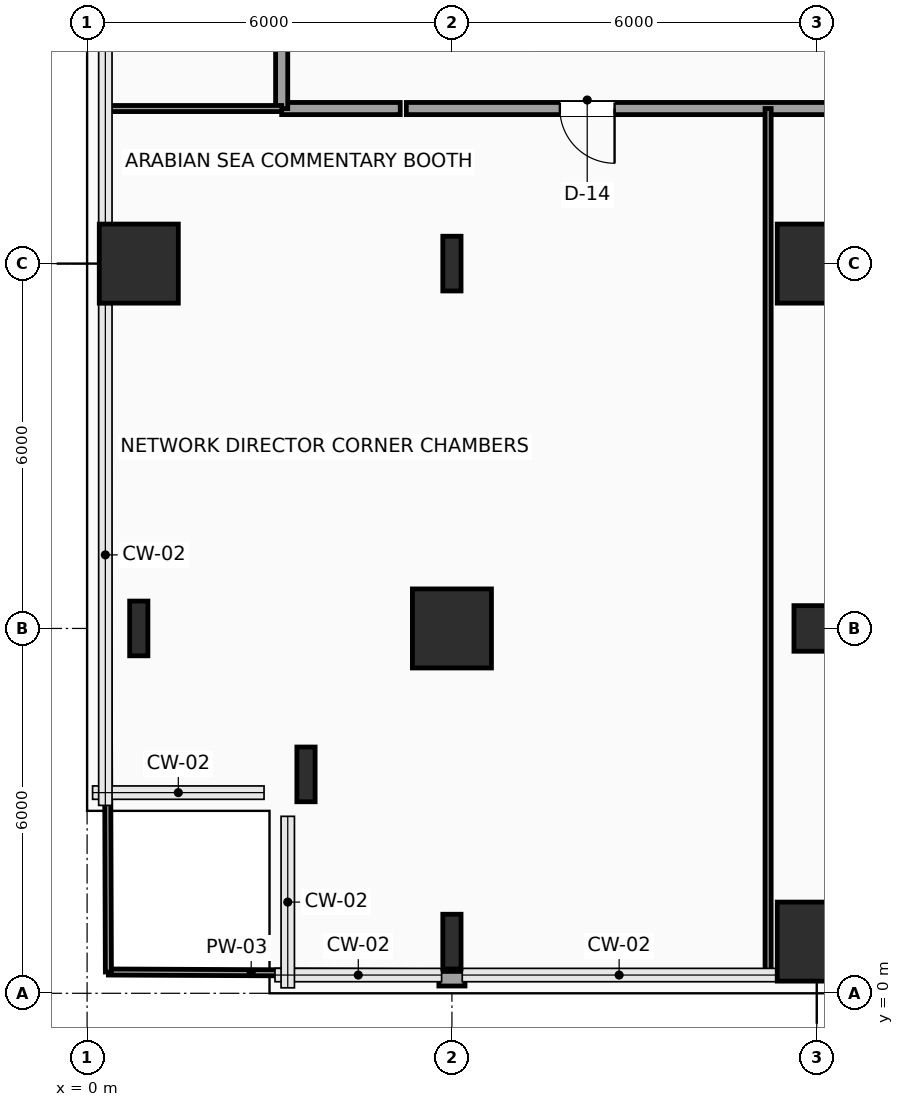
"""IFC4 building model, lengths in metres.
Left out: names, types, materials, properties, quantities, classifications, styles, units other than length and angle.
Written with IfcOpenShell. Run it as: python <this file> out.ifc"""

import sys

from ifc_helpers import new_model, si_unit, direction, frame, frame_2d, origin, origin_2d, place, context, subcontext, project, spatial, rectangle, hollow_rectangle, i_section, extrude, element, fill, save


model = new_model("IFC4")
c1 = context("Model", 3, precision=1e-05, world=origin(), true_north=direction((0.0, 1.0)))
c2 = subcontext(c1, "Body", "Model", "MODEL_VIEW")
j1 = project(units=[si_unit("LENGTHUNIT", "METRE"), si_unit("PLANEANGLEUNIT", "RADIAN")], contexts=[c1])
p1 = place(None, origin())
s1 = spatial("IfcSite", under=j1, at=p1, CompositionType="ELEMENT")
p2 = place(p1, origin())
s2 = spatial("IfcBuilding", under=s1, at=p2, CompositionType="ELEMENT")
p3 = place(p2, frame((0.0, 0.0, 90.9)))
s3 = spatial("IfcBuildingStorey", under=s2, at=p3, CompositionType="ELEMENT", Elevation=90.9)
for number, where, z_axis, x_axis in (
    (1, (3.6, 3.6, 0.0), (0.0, 0.0, 1.0), (1.0, 0.0, 0.0)),
    (2, (0.85, 6.0, 0.0), (0.0, 0.0, 1.0), (1.0, 0.0, 0.0)),
):
    element("IfcColumn", number, at=place(p3, frame(where, z_axis=z_axis, x_axis=x_axis)), inside=s3, PredefinedType="COLUMN", context=c2, shape_type="SweptSolid", body=[
        extrude(i_section(OverallWidth=0.3, OverallDepth=0.9, WebThickness=0.019, FlangeThickness=0.035, FilletRadius=0.03, at=origin_2d()), origin(), (0.0, 0.0, 1.0), 3.9),
    ])
p4 = place(p3, frame((0.85, 12.0, 0.0), z_axis=(0.0, 0.0, 1.0), x_axis=(1.0, 0.0, 0.0)))
e3 = element("IfcColumn", 3, at=p4, inside=s3, PredefinedType="COLUMN", context=c2, shape_type="SweptSolid", body=[
    extrude(rectangle(XDim=1.3, YDim=1.3, at=origin_2d()), origin(), (0.0, 0.0, 1.0), 3.9),
])
p5 = place(p3, frame((6.0, 0.85, 0.0), z_axis=(0.0, 0.0, 1.0), x_axis=(1.0, 0.0, 0.0)))
e4 = element("IfcColumn", 4, at=p5, inside=s3, PredefinedType="COLUMN", context=c2, shape_type="SweptSolid", body=[
    extrude(i_section(OverallWidth=0.3, OverallDepth=0.9, WebThickness=0.019, FlangeThickness=0.035, FilletRadius=0.03, at=origin_2d()), origin(), (0.0, 0.0, 1.0), 3.9),
])
p6 = place(p3, frame((6.0, 6.0, 0.0), z_axis=(0.0, 0.0, 1.0), x_axis=(1.0, 0.0, 0.0)))
e5 = element("IfcColumn", 5, at=p6, inside=s3, PredefinedType="COLUMN", context=c2, shape_type="SweptSolid", body=[
    extrude(rectangle(XDim=1.3, YDim=1.3, at=origin_2d()), origin(), (0.0, 0.0, 1.0), 3.9),
])
p7 = place(p3, frame((6.0, 12.0, 0.0), z_axis=(0.0, 0.0, 1.0), x_axis=(1.0, 0.0, 0.0)))
e6 = element("IfcColumn", 6, at=p7, inside=s3, PredefinedType="COLUMN", context=c2, shape_type="SweptSolid", body=[
    extrude(i_section(OverallWidth=0.3, OverallDepth=0.9, WebThickness=0.019, FlangeThickness=0.035, FilletRadius=0.03, at=origin_2d()), origin(), (0.0, 0.0, 1.0), 3.9),
])
p8 = place(p3, frame((12.0, 0.85, 0.0), z_axis=(0.0, 0.0, 1.0), x_axis=(1.0, 0.0, 0.0)))
e7 = element("IfcColumn", 7, at=p8, inside=s3, PredefinedType="COLUMN", context=c2, shape_type="SweptSolid", body=[
    extrude(rectangle(XDim=1.3, YDim=1.3, at=origin_2d()), origin(), (0.0, 0.0, 1.0), 3.9),
])
p9 = place(p3, frame((12.0, 6.0, 0.0), z_axis=(0.0, 0.0, 1.0), x_axis=(1.0, 0.0, 0.0)))
e8 = element("IfcColumn", 8, at=p9, inside=s3, PredefinedType="COLUMN", context=c2, shape_type="SweptSolid", body=[
    extrude(hollow_rectangle(XDim=0.75, YDim=0.75, WallThickness=0.035, InnerFilletRadius=0.035, OuterFilletRadius=0.05, at=origin_2d()), origin(), (0.0, 0.0, 1.0), 3.9),
])
p10 = place(p3, frame((12.0, 12.0, 0.0), z_axis=(0.0, 0.0, 1.0), x_axis=(1.0, 0.0, 0.0)))
e9 = element("IfcColumn", 9, at=p10, inside=s3, PredefinedType="COLUMN", context=c2, shape_type="SweptSolid", body=[
    extrude(rectangle(XDim=1.3, YDim=1.3, at=origin_2d()), origin(), (0.0, 0.0, 1.0), 3.9),
])
p11 = place(p3, frame((6.215, 0.24, 0.0), z_axis=(0.0, 0.0, 1.0), x_axis=(-1.0, 0.0, 0.0)))
e10 = element("IfcWall", 10, at=p11, inside=s3, PredefinedType="SOLIDWALL", context=c2, shape_type="SweptSolid", body=[
    extrude(rectangle(XDim=0.43, YDim=0.24, at=frame_2d((0.215, 0.0))), origin(), (0.0, 0.0, 1.0), 3.575),
])
p12 = place(p3, frame((12.4, 14.55, 0.0), z_axis=(0.0, 0.0, 1.0), x_axis=(-1.0, 0.0, 0.0)))
e11 = element("IfcWall", 11, at=p12, inside=s3, PredefinedType="SOLIDWALL", context=c2, shape_type="SweptSolid", body=[
    extrude(rectangle(XDim=7.15, YDim=0.2, at=frame_2d((3.575, 0.0))), origin(), (0.0, 0.0, 1.0), 3.575),
])
p13 = place(p12, frame((3.725, 0.0, 0.0)))
e12 = element("IfcOpeningElement", 12, at=p13, cuts=e11, PredefinedType="OPENING", context=c2, shape_type="SweptSolid", body=[
    extrude(rectangle(XDim=0.9, YDim=2.1, at=frame_2d((0.45, 1.05))), frame((0.0, 0.11, 0.0), z_axis=(0.0, -1.0, 0.0), x_axis=(1.0, 0.0, 0.0)), (0.0, 0.0, 1.0), 0.22),
])
p14 = place(p3, frame((5.15, 14.55, 0.0), z_axis=(0.0, 0.0, 1.0), x_axis=(-1.0, 0.0, 0.0)))
e13 = element("IfcWall", 13, at=p14, inside=s3, PredefinedType="SOLIDWALL", context=c2, shape_type="SweptSolid", body=[
    extrude(rectangle(XDim=1.95, YDim=0.2, at=frame_2d((0.975, 0.0))), origin(), (0.0, 0.0, 1.0), 3.575),
])
p15 = place(p3, frame((3.2, 14.55, 0.0), z_axis=(0.0, 0.0, 1.0), x_axis=(0.0, 1.0, 0.0)))
e14 = element("IfcWall", 14, at=p15, inside=s3, PredefinedType="SOLIDWALL", context=c2, shape_type="SweptSolid", body=[
    extrude(rectangle(XDim=15.7, YDim=0.2, at=frame_2d((7.85, 0.0))), origin(), (0.0, 0.0, 1.0), 3.575),
])
p16 = place(p15, frame((2.65, 0.0, 0.0)))
e15 = element("IfcOpeningElement", 15, at=p16, cuts=e14, PredefinedType="OPENING", context=c2, shape_type="SweptSolid", body=[
    extrude(rectangle(XDim=0.9, YDim=2.1, at=frame_2d((0.45, 1.05))), frame((0.0, 0.11, 0.0), z_axis=(0.0, -1.0, 0.0), x_axis=(1.0, 0.0, 0.0)), (0.0, 0.0, 1.0), 0.22),
])
p17 = place(p15, frame((8.85, 0.0, 0.0)))
e16 = element("IfcOpeningElement", 16, at=p17, cuts=e14, PredefinedType="OPENING", context=c2, shape_type="SweptSolid", body=[
    extrude(rectangle(XDim=0.9, YDim=2.1, at=frame_2d((0.45, 1.05))), frame((0.0, 0.11, 0.0), z_axis=(0.0, -1.0, 0.0), x_axis=(1.0, 0.0, 0.0)), (0.0, 0.0, 1.0), 0.22),
])
p18 = place(p15, frame((13.6, 0.0, 0.0)))
e17 = element("IfcOpeningElement", 17, at=p18, cuts=e14, PredefinedType="OPENING", context=c2, shape_type="SweptSolid", body=[
    extrude(rectangle(XDim=0.9, YDim=2.1, at=frame_2d((0.45, 1.05))), frame((0.0, 0.11, 0.0), z_axis=(0.0, -1.0, 0.0), x_axis=(1.0, 0.0, 0.0)), (0.0, 0.0, 1.0), 0.22),
])
p19 = place(p3, frame((0.35, 0.35, 0.0), z_axis=(0.0, 0.0, 1.0), x_axis=(0.99998929595, -0.004626876487, 0.0)))
e18 = element("IfcWall", 18, at=p19, inside=s3, PredefinedType="PARTITIONING", context=c2, shape_type="SweptSolid", body=[
    extrude(rectangle(XDim=5.435, YDim=0.1, at=frame_2d((2.717, 0.0))), origin(), (0.0, 0.0, 1.0), 3.575),
])
p20 = place(p3, frame((6.215, 0.323, 0.0), z_axis=(0.0, 0.0, 1.0), x_axis=(0.999989402769, -0.00460373219, 0.0)))
e19 = element("IfcWall", 19, at=p20, inside=s3, PredefinedType="PARTITIONING", context=c2, shape_type="SweptSolid", body=[
    extrude(rectangle(XDim=4.985, YDim=0.1, at=frame_2d((2.492, 0.0))), origin(), (0.0, 0.0, 1.0), 3.575),
])
p21 = place(p3, frame((0.35, 0.35, 0.0), z_axis=(0.0, 0.0, 1.0), x_axis=(-0.003524555588, 0.999993788735, 0.0)))
e20 = element("IfcWall", 20, at=p21, inside=s3, PredefinedType="PARTITIONING", context=c2, shape_type="SweptSolid", body=[
    extrude(rectangle(XDim=14.2, YDim=0.1, at=frame_2d((7.1, 0.0))), origin(), (0.0, 0.0, 1.0), 3.575),
])
p22 = place(p3, frame((11.2, 0.3, 0.0), z_axis=(0.0, 0.0, 1.0), x_axis=(0.0, 1.0, 0.0)))
e21 = element("IfcWall", 21, at=p22, inside=s3, PredefinedType="PARTITIONING", context=c2, shape_type="SweptSolid", body=[
    extrude(rectangle(XDim=14.25, YDim=0.1, at=frame_2d((7.125, 0.0))), origin(), (0.0, 0.0, 1.0), 3.575),
])
p23 = place(p3, frame((0.3, 14.55, 0.0), z_axis=(0.0, 0.0, 1.0), x_axis=(1.0, 0.0, 0.0)))
e22 = element("IfcWall", 22, at=p23, inside=s3, PredefinedType="PARTITIONING", context=c2, shape_type="SweptSolid", body=[
    extrude(rectangle(XDim=2.9, YDim=0.1, at=frame_2d((1.45, 0.0))), origin(), (0.0, 0.0, 1.0), 3.575),
])
p24 = place(p13, origin())
e23 = element("IfcDoor", 23, at=p24, inside=s3, OperationType="SINGLE_SWING_LEFT", PredefinedType="DOOR", context=c2, shape_type="SweptSolid", body=[
    extrude(rectangle(XDim=0.9, YDim=2.1, at=frame_2d((0.45, 1.05))), frame((0.0, 0.025, 0.0), z_axis=(0.0, -1.0, 0.0), x_axis=(1.0, 0.0, 0.0)), (0.0, 0.0, 1.0), 0.05),
])
fill(e12, e23)
save(model, sys.argv[1])
